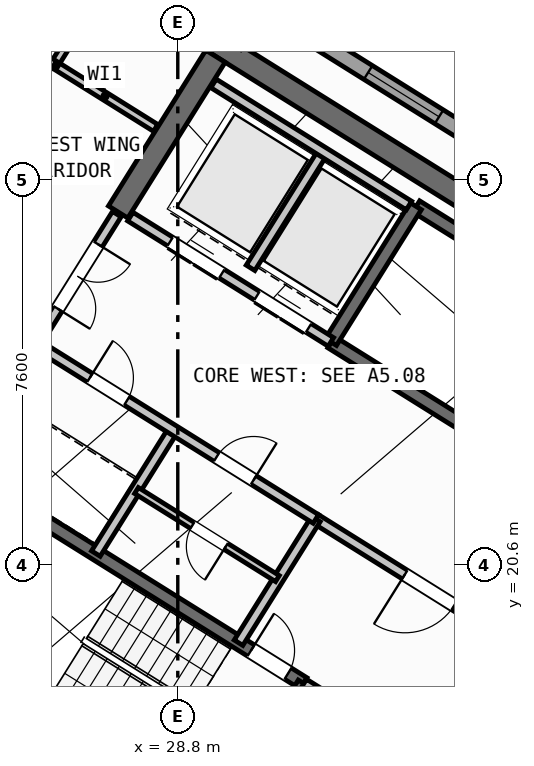
"""IFC4 building model, lengths in metres.
Left out: names, types, materials, properties, quantities, classifications, styles, units other than length and angle.
Written with IfcOpenShell. Run it as: python <this file> out.ifc"""

import sys

from ifc_helpers import new_model, si_unit, direction, frame, frame_2d, origin, place, context, subcontext, project, spatial, rectangle, extrude, source, transform, mapped, element, fill, save


model = new_model("IFC4")
c1 = context("Model", 3, precision=1e-05, world=origin(), true_north=direction((0.0, 1.0)))
c2 = subcontext(c1, "Body", "Model", "MODEL_VIEW")
j1 = project(units=[si_unit("LENGTHUNIT", "METRE"), si_unit("PLANEANGLEUNIT", "RADIAN")], contexts=[c1])
p1 = place(None, origin())
s1 = spatial("IfcSite", under=j1, at=p1, CompositionType="ELEMENT")
p2 = place(p1, origin())
s2 = spatial("IfcBuilding", under=s1, at=p2, CompositionType="ELEMENT")
p3 = place(p2, frame((0.0, 0.0, 262.8)))
s3 = spatial("IfcBuildingStorey", under=s2, at=p3, CompositionType="ELEMENT", Elevation=262.8)
p4 = place(p3, frame((40.531, 24.036, 0.0), z_axis=(0.0, 0.0, 1.0), x_axis=(-0.848048787466, 0.529918157905, 0.0)))
e1 = element("IfcWall", 1, at=p4, inside=s3, PredefinedType="SHEAR", context=c2, shape_type="SweptSolid", body=[
    extrude(rectangle(XDim=13.04, YDim=0.45, at=frame_2d((6.52, 0.0))), origin(), (0.0, 0.0, 1.0), 3.35),
])
p5 = place(p3, frame((33.324, 12.503, 0.0), z_axis=(0.0, 0.0, 1.0), x_axis=(-0.848043529849, 0.529926571782, 0.0)))
e2 = element("IfcWall", 2, at=p5, inside=s3, PredefinedType="SHEAR", context=c2, shape_type="SweptSolid", body=[
    extrude(rectangle(XDim=13.04, YDim=0.45, at=frame_2d((6.52, 0.0))), origin(), (0.0, 0.0, 1.0), 3.35),
])
p6 = place(p3, frame((36.683, 18.304, 0.0), z_axis=(0.0, 0.0, 1.0), x_axis=(-0.529904039071, -0.848057609704, 0.0)))
e3 = element("IfcWall", 3, at=p6, inside=s3, PredefinedType="SHEAR", context=c2, shape_type="SweptSolid", body=[
    extrude(rectangle(XDim=6.475, YDim=0.45, at=frame_2d((3.238, 0.0))), origin(), (0.0, 0.0, 1.0), 3.35),
])
p7 = place(p3, frame((29.544, 30.636, 0.0), z_axis=(0.0, 0.0, 1.0), x_axis=(-0.529902075036, -0.848058836916, 0.0)))
e4 = element("IfcWall", 4, at=p7, inside=s3, PredefinedType="SHEAR", context=c2, shape_type="SweptSolid", body=[
    extrude(rectangle(XDim=3.625, YDim=0.45, at=frame_2d((1.812, 0.0))), origin(), (0.0, 0.0, 1.0), 3.35),
])
p8 = place(p3, frame((29.268, 6.429, 0.0), z_axis=(0.0, 0.0, 1.0), x_axis=(-0.848049971435, 0.529916263149, 0.0)))
e5 = element("IfcWall", 5, at=p8, inside=s3, PredefinedType="STANDARD", context=c2, shape_type="SweptSolid", body=[
    extrude(rectangle(XDim=31.588, YDim=0.32, at=frame_2d((15.794, 0.0))), origin(), (0.0, 0.0, 1.0), 3.35),
])
p9 = place(p8, frame((16.362, 0.0, 0.0)))
e6 = element("IfcOpeningElement", 6, at=p9, cuts=e5, PredefinedType="OPENING", context=c2, shape_type="SweptSolid", body=[
    extrude(rectangle(XDim=1.2, YDim=2.15, at=frame_2d((0.6, 1.075))), frame((0.0, 0.17, 0.0), z_axis=(0.0, -1.0, 0.0), x_axis=(1.0, 0.0, 0.0)), (0.0, 0.0, 1.0), 0.34),
])
p10 = place(p8, frame((3.859, 0.0, 0.9)))
e7 = element("IfcOpeningElement", 7, at=p10, cuts=e5, PredefinedType="OPENING", context=c2, shape_type="SweptSolid", body=[
    extrude(rectangle(XDim=1.65, YDim=1.45, at=frame_2d((0.825, 0.725))), frame((0.0, 0.17, 0.0), z_axis=(0.0, -1.0, 0.0), x_axis=(1.0, 0.0, 0.0)), (0.0, 0.0, 1.0), 0.34),
])
p11 = place(p8, frame((10.519, 0.0, 0.9)))
e8 = element("IfcOpeningElement", 8, at=p11, cuts=e5, PredefinedType="OPENING", context=c2, shape_type="SweptSolid", body=[
    extrude(rectangle(XDim=1.65, YDim=1.45, at=frame_2d((0.825, 0.725))), frame((0.0, 0.17, 0.0), z_axis=(0.0, -1.0, 0.0), x_axis=(1.0, 0.0, 0.0)), (0.0, 0.0, 1.0), 0.34),
])
p12 = place(p8, frame((20.015, 0.0, 0.95)))
e9 = element("IfcOpeningElement", 9, at=p12, cuts=e5, PredefinedType="OPENING", context=c2, shape_type="SweptSolid", body=[
    extrude(rectangle(XDim=1.95, YDim=1.35, at=frame_2d((0.975, 0.675))), frame((0.0, 0.17, 0.0), z_axis=(0.0, -1.0, 0.0), x_axis=(1.0, 0.0, 0.0)), (0.0, 0.0, 1.0), 0.34),
])
p13 = place(p8, frame((23.715, 0.0, 1.0)))
e10 = element("IfcOpeningElement", 10, at=p13, cuts=e5, PredefinedType="OPENING", context=c2, shape_type="SweptSolid", body=[
    extrude(rectangle(XDim=0.9, YDim=1.25, at=frame_2d((0.45, 0.625))), frame((0.0, 0.17, 0.0), z_axis=(0.0, -1.0, 0.0), x_axis=(1.0, 0.0, 0.0)), (0.0, 0.0, 1.0), 0.34),
])
p14 = place(p8, frame((26.391, 0.0, 0.9)))
e11 = element("IfcOpeningElement", 11, at=p14, cuts=e5, PredefinedType="OPENING", context=c2, shape_type="SweptSolid", body=[
    extrude(rectangle(XDim=1.65, YDim=1.45, at=frame_2d((0.825, 0.725))), frame((0.0, 0.17, 0.0), z_axis=(0.0, -1.0, 0.0), x_axis=(1.0, 0.0, 0.0)), (0.0, 0.0, 1.0), 0.34),
])
p15 = place(p8, frame((29.878, 0.0, 1.0)))
e12 = element("IfcOpeningElement", 12, at=p15, cuts=e5, PredefinedType="OPENING", context=c2, shape_type="SweptSolid", body=[
    extrude(rectangle(XDim=0.9, YDim=1.25, at=frame_2d((0.45, 0.625))), frame((0.0, 0.17, 0.0), z_axis=(0.0, -1.0, 0.0), x_axis=(1.0, 0.0, 0.0)), (0.0, 0.0, 1.0), 0.34),
])
p16 = place(p3, frame((14.138, 41.825, 0.0), z_axis=(0.0, 0.0, 1.0), x_axis=(0.848046498049, -0.529921821731, 0.0)))
e13 = element("IfcWall", 13, at=p16, inside=s3, PredefinedType="STANDARD", context=c2, shape_type="SweptSolid", body=[
    extrude(rectangle(XDim=31.588, YDim=0.32, at=frame_2d((15.794, 0.0))), origin(), (0.0, 0.0, 1.0), 3.35),
])
p17 = place(p16, frame((3.568, 0.0, 0.0)))
e14 = element("IfcOpeningElement", 14, at=p17, cuts=e13, PredefinedType="OPENING", context=c2, shape_type="SweptSolid", body=[
    extrude(rectangle(XDim=1.05, YDim=2.15, at=frame_2d((0.525, 1.075))), frame((0.0, 0.17, 0.0), z_axis=(0.0, -1.0, 0.0), x_axis=(1.0, 0.0, 0.0)), (0.0, 0.0, 1.0), 0.34),
])
p18 = place(p16, frame((1.046, 0.0, 0.9)))
e15 = element("IfcOpeningElement", 15, at=p18, cuts=e13, PredefinedType="OPENING", context=c2, shape_type="SweptSolid", body=[
    extrude(rectangle(XDim=1.65, YDim=1.45, at=frame_2d((0.825, 0.725))), frame((0.0, 0.17, 0.0), z_axis=(0.0, -1.0, 0.0), x_axis=(1.0, 0.0, 0.0)), (0.0, 0.0, 1.0), 0.34),
])
p19 = place(p16, frame((8.61, 0.0, 0.9)))
e16 = element("IfcOpeningElement", 16, at=p19, cuts=e13, PredefinedType="OPENING", context=c2, shape_type="SweptSolid", body=[
    extrude(rectangle(XDim=1.35, YDim=1.45, at=frame_2d((0.675, 0.725))), frame((0.0, 0.17, 0.0), z_axis=(0.0, -1.0, 0.0), x_axis=(1.0, 0.0, 0.0)), (0.0, 0.0, 1.0), 0.34),
])
p20 = place(p16, frame((13.599, 0.0, 0.95)))
e17 = element("IfcOpeningElement", 17, at=p20, cuts=e13, PredefinedType="OPENING", context=c2, shape_type="SweptSolid", body=[
    extrude(rectangle(XDim=1.95, YDim=1.35, at=frame_2d((0.975, 0.675))), frame((0.0, 0.17, 0.0), z_axis=(0.0, -1.0, 0.0), x_axis=(1.0, 0.0, 0.0)), (0.0, 0.0, 1.0), 0.34),
])
p21 = place(p16, frame((17.154, 0.0, 1.0)))
e18 = element("IfcOpeningElement", 18, at=p21, cuts=e13, PredefinedType="OPENING", context=c2, shape_type="SweptSolid", body=[
    extrude(rectangle(XDim=0.9, YDim=1.25, at=frame_2d((0.45, 0.625))), frame((0.0, 0.17, 0.0), z_axis=(0.0, -1.0, 0.0), x_axis=(1.0, 0.0, 0.0)), (0.0, 0.0, 1.0), 0.34),
])
p22 = place(p16, frame((21.719, 0.0, 0.9)))
e19 = element("IfcOpeningElement", 19, at=p22, cuts=e13, PredefinedType="OPENING", context=c2, shape_type="SweptSolid", body=[
    extrude(rectangle(XDim=1.65, YDim=1.45, at=frame_2d((0.825, 0.725))), frame((0.0, 0.17, 0.0), z_axis=(0.0, -1.0, 0.0), x_axis=(1.0, 0.0, 0.0)), (0.0, 0.0, 1.0), 0.34),
])
p23 = place(p16, frame((27.419, 0.0, 0.9)))
e20 = element("IfcOpeningElement", 20, at=p23, cuts=e13, PredefinedType="OPENING", context=c2, shape_type="SweptSolid", body=[
    extrude(rectangle(XDim=1.65, YDim=1.45, at=frame_2d((0.825, 0.725))), frame((0.0, 0.17, 0.0), z_axis=(0.0, -1.0, 0.0), x_axis=(1.0, 0.0, 0.0)), (0.0, 0.0, 1.0), 0.34),
])
p24 = place(p3, frame((29.605, 15.581, 0.0), z_axis=(0.0, 0.0, 1.0), x_axis=(-0.848036911448, 0.529937163087, 0.0)))
e21 = element("IfcWall", 21, at=p24, inside=s3, PredefinedType="SHEAR", context=c2, shape_type="SweptSolid", body=[
    extrude(rectangle(XDim=7.46, YDim=0.26, at=frame_2d((3.73, 0.0))), origin(), (0.0, 0.0, 1.0), 3.35),
])
p25 = place(p3, frame((31.28, 18.261, 0.0), z_axis=(0.0, 0.0, 1.0), x_axis=(-0.848051618787, 0.529913626805, 0.0)))
e22 = element("IfcWall", 22, at=p25, inside=s3, PredefinedType="SHEAR", context=c2, shape_type="SweptSolid", body=[
    extrude(rectangle(XDim=7.46, YDim=0.26, at=frame_2d((3.73, 0.0))), origin(), (0.0, 0.0, 1.0), 3.35),
])
p26 = place(p25, frame((0.36, 0.0, 0.0)))
e23 = element("IfcOpeningElement", 23, at=p26, cuts=e22, PredefinedType="OPENING", context=c2, shape_type="SweptSolid", body=[
    extrude(rectangle(XDim=0.86, YDim=2.05, at=frame_2d((0.43, 1.025))), frame((0.0, 0.14, 0.0), z_axis=(0.0, -1.0, 0.0), x_axis=(1.0, 0.0, 0.0)), (0.0, 0.0, 1.0), 0.28),
])
p27 = place(p3, frame((31.288, 18.256, 0.0), z_axis=(0.0, 0.0, 1.0), x_axis=(-0.529943379326, -0.848033026897, 0.0)))
e24 = element("IfcWall", 24, at=p27, inside=s3, PredefinedType="SHEAR", context=c2, shape_type="SweptSolid", body=[
    extrude(rectangle(XDim=3.16, YDim=0.26, at=frame_2d((1.58, 0.0))), origin(), (0.0, 0.0, 1.0), 3.35),
])
p28 = place(p3, frame((39.721, 23.788, 0.0), z_axis=(0.0, 0.0, 1.0), x_axis=(-0.848054434086, 0.529909121291, 0.0)))
e25 = element("IfcWall", 25, at=p28, inside=s3, PredefinedType="SHEAR", context=c2, shape_type="SweptSolid", body=[
    extrude(rectangle(XDim=7.33, YDim=0.26, at=frame_2d((3.665, 0.0))), origin(), (0.0, 0.0, 1.0), 3.35),
])
p29 = place(p3, frame((38.046, 21.108, 0.0), z_axis=(0.0, 0.0, 1.0), x_axis=(-0.848054434086, 0.529909121291, 0.0)))
e26 = element("IfcWall", 26, at=p29, inside=s3, PredefinedType="SHEAR", context=c2, shape_type="SweptSolid", body=[
    extrude(rectangle(XDim=7.33, YDim=0.26, at=frame_2d((3.665, 0.0))), origin(), (0.0, 0.0, 1.0), 3.35),
])
p30 = place(p29, frame((0.22, 0.0, 0.0)))
e27 = element("IfcOpeningElement", 27, at=p30, cuts=e26, PredefinedType="OPENING", context=c2, shape_type="SweptSolid", body=[
    extrude(rectangle(XDim=1.1, YDim=2.1, at=frame_2d((0.55, 1.05))), frame((0.0, 0.14, 0.0), z_axis=(0.0, -1.0, 0.0), x_axis=(1.0, 0.0, 0.0)), (0.0, 0.0, 1.0), 0.28),
])
p31 = place(p3, frame((33.496, 27.677, 0.0), z_axis=(0.0, 0.0, 1.0), x_axis=(-0.529908658664, -0.84805472316, 0.0)))
e28 = element("IfcWall", 28, at=p31, inside=s3, PredefinedType="SHEAR", context=c2, shape_type="SweptSolid", body=[
    extrude(rectangle(XDim=3.16, YDim=0.26, at=frame_2d((1.58, 0.0))), origin(), (0.0, 0.0, 1.0), 3.35),
])
p32 = place(p3, frame((34.933, 15.978, 0.0), z_axis=(0.0, 0.0, 1.0), x_axis=(-0.848055739377, 0.529907032327, 0.0)))
e29 = element("IfcWall", 29, at=p32, inside=s3, PredefinedType="STANDARD", context=c2, shape_type="SweptSolid", body=[
    extrude(rectangle(XDim=4.298, YDim=0.2, at=frame_2d((2.149, 0.0))), origin(), (0.0, 0.0, 1.0), 3.34),
])
p33 = place(p32, frame((0.448, 0.0, 0.0)))
e30 = element("IfcOpeningElement", 30, at=p33, cuts=e29, PredefinedType="OPENING", context=c2, shape_type="SweptSolid", body=[
    extrude(rectangle(XDim=1.3, YDim=2.2, at=frame_2d((0.65, 1.1))), frame((0.0, 0.11, 0.0), z_axis=(0.0, -1.0, 0.0), x_axis=(1.0, 0.0, 0.0)), (0.0, 0.0, 1.0), 0.22),
])
p34 = place(p32, frame((2.523, 0.0, 0.0)))
e31 = element("IfcOpeningElement", 31, at=p34, cuts=e29, PredefinedType="OPENING", context=c2, shape_type="SweptSolid", body=[
    extrude(rectangle(XDim=1.45, YDim=2.25, at=frame_2d((0.725, 1.125))), frame((0.0, 0.11, 0.0), z_axis=(0.0, -1.0, 0.0), x_axis=(1.0, 0.0, 0.0)), (0.0, 0.0, 1.0), 0.22),
])
p35 = place(p3, frame((36.459, 18.421, 0.0), z_axis=(0.0, 0.0, 1.0), x_axis=(-0.848059591691, 0.529900867089, 0.0)))
e32 = element("IfcWall", 32, at=p35, inside=s3, PredefinedType="STANDARD", context=c2, shape_type="SweptSolid", body=[
    extrude(rectangle(XDim=5.818, YDim=0.2, at=frame_2d((2.909, 0.0))), origin(), (0.0, 0.0, 1.0), 3.34),
])
p36 = place(p35, frame((2.598, 0.0, 0.0)))
e33 = element("IfcOpeningElement", 33, at=p36, cuts=e32, PredefinedType="OPENING", context=c2, shape_type="SweptSolid", body=[
    extrude(rectangle(XDim=1.15, YDim=2.1, at=frame_2d((0.575, 1.05))), frame((0.0, 0.11, 0.0), z_axis=(0.0, -1.0, 0.0), x_axis=(1.0, 0.0, 0.0)), (0.0, 0.0, 1.0), 0.22),
])
p37 = place(p3, frame((31.822, 24.998, 0.0), z_axis=(0.0, 0.0, 1.0), x_axis=(-0.848054125777, 0.529909614701, 0.0)))
e34 = element("IfcWall", 34, at=p37, inside=s3, PredefinedType="STANDARD", context=c2, shape_type="SweptSolid", body=[
    extrude(rectangle(XDim=4.668, YDim=0.2, at=frame_2d((2.334, 0.0))), origin(), (0.0, 0.0, 1.0), 3.34),
])
p38 = place(p37, frame((0.52, 0.0, 0.0)))
e35 = element("IfcOpeningElement", 35, at=p38, cuts=e34, PredefinedType="OPENING", context=c2, shape_type="SweptSolid", body=[
    extrude(rectangle(XDim=1.2, YDim=2.15, at=frame_2d((0.6, 1.075))), frame((0.0, 0.11, 0.0), z_axis=(0.0, -1.0, 0.0), x_axis=(1.0, 0.0, 0.0)), (0.0, 0.0, 1.0), 0.22),
])
p39 = place(p37, frame((2.54, 0.0, 0.0)))
e36 = element("IfcOpeningElement", 36, at=p39, cuts=e34, PredefinedType="OPENING", context=c2, shape_type="SweptSolid", body=[
    extrude(rectangle(XDim=1.2, YDim=2.15, at=frame_2d((0.6, 1.075))), frame((0.0, 0.11, 0.0), z_axis=(0.0, -1.0, 0.0), x_axis=(1.0, 0.0, 0.0)), (0.0, 0.0, 1.0), 0.22),
])
p40 = place(p3, frame((31.645, 28.716, 0.0), z_axis=(0.0, 0.0, 1.0), x_axis=(-0.52986693015, -0.848080795876, 0.0)))
e37 = element("IfcWall", 37, at=p40, inside=s3, PredefinedType="STANDARD", context=c2, shape_type="SweptSolid", body=[
    extrude(rectangle(XDim=2.66, YDim=0.2, at=frame_2d((1.33, 0.0))), origin(), (0.0, 0.0, 1.0), 3.34),
])
p41 = place(p3, frame((33.363, 27.69, 0.0), z_axis=(0.0, 0.0, 1.0), x_axis=(-0.84804957148, 0.529916903215, 0.0)))
e38 = element("IfcWall", 38, at=p41, inside=s3, PredefinedType="STANDARD", context=c2, shape_type="SweptSolid", body=[
    extrude(rectangle(XDim=4.548, YDim=0.2, at=frame_2d((2.274, 0.0))), origin(), (0.0, 0.0, 1.0), 3.34),
])
for number, where, z_axis, x_axis in (
    (39, (31.525, 21.504, 0.0), (0.0, 0.0, 1.0), (-0.53, -0.848, 0.0)),
    (40, (28.71, 23.263, 0.0), (0.0, 0.0, 1.0), (-0.53, -0.848, 0.0)),
):
    element("IfcWall", number, at=place(p3, frame(where, z_axis=z_axis, x_axis=x_axis)), inside=s3, PredefinedType="STANDARD", context=c2, shape_type="SweptSolid", body=[
        extrude(rectangle(XDim=2.88, YDim=0.2, at=frame_2d((1.44, 0.0))), origin(), (0.0, 0.0, 1.0), 3.34),
    ])
p42 = place(p3, frame((31.525, 21.504, 0.0), z_axis=(0.0, 0.0, 1.0), x_axis=(-0.848042066329, 0.529928913853, 0.0)))
e41 = element("IfcWall", 41, at=p42, inside=s3, PredefinedType="STANDARD", context=c2, shape_type="SweptSolid", body=[
    extrude(rectangle(XDim=6.268, YDim=0.2, at=frame_2d((3.134, 0.0))), origin(), (0.0, 0.0, 1.0), 3.34),
])
p43 = place(p42, frame((4.4, 0.0, 0.0)))
e42 = element("IfcOpeningElement", 42, at=p43, cuts=e41, PredefinedType="OPENING", context=c2, shape_type="SweptSolid", body=[
    extrude(rectangle(XDim=0.86, YDim=2.05, at=frame_2d((0.43, 1.025))), frame((0.0, 0.11, 0.0), z_axis=(0.0, -1.0, 0.0), x_axis=(1.0, 0.0, 0.0)), (0.0, 0.0, 1.0), 0.22),
])
p44 = place(p42, frame((1.45, 0.0, 0.0)))
e43 = element("IfcOpeningElement", 43, at=p44, cuts=e41, PredefinedType="OPENING", context=c2, shape_type="SweptSolid", body=[
    extrude(rectangle(XDim=0.86, YDim=2.05, at=frame_2d((0.43, 1.025))), frame((0.0, 0.11, 0.0), z_axis=(0.0, -1.0, 0.0), x_axis=(1.0, 0.0, 0.0)), (0.0, 0.0, 1.0), 0.22),
])
p45 = place(p3, frame((30.766, 20.327, 0.0), z_axis=(0.0, 0.0, 1.0), x_axis=(-0.848052663127, 0.529911955482, 0.0)))
e44 = element("IfcWall", 44, at=p45, inside=s3, PredefinedType="PLUMBINGWALL", context=c2, shape_type="SweptSolid", body=[
    extrude(rectangle(XDim=3.28, YDim=0.14, at=frame_2d((1.64, 0.0))), origin(), (0.0, 0.0, 1.0), 3.34),
])
p46 = place(p45, frame((1.2, 0.0, 0.0)))
e45 = element("IfcOpeningElement", 45, at=p46, cuts=e44, PredefinedType="OPENING", context=c2, shape_type="SweptSolid", body=[
    extrude(rectangle(XDim=0.78, YDim=2.05, at=frame_2d((0.39, 1.025))), frame((0.0, 0.08, 0.0), z_axis=(0.0, -1.0, 0.0), x_axis=(1.0, 0.0, 0.0)), (0.0, 0.0, 1.0), 0.16),
])
p47 = place(p3, frame((27.596, 27.52, 0.0), z_axis=(0.0, 0.0, 1.0), x_axis=(-0.529865479138, -0.848081702443, 0.0)))
e46 = element("IfcWall", 46, at=p47, inside=s3, PredefinedType="STANDARD", context=c2, shape_type="SweptSolid", body=[
    extrude(rectangle(XDim=2.96, YDim=0.2, at=frame_2d((1.48, 0.0))), origin(), (0.0, 0.0, 1.0), 3.34),
])
p48 = place(p47, frame((0.7, 0.0, 0.0)))
e47 = element("IfcOpeningElement", 47, at=p48, cuts=e46, PredefinedType="OPENING", context=c2, shape_type="SweptSolid", body=[
    extrude(rectangle(XDim=1.5, YDim=2.15, at=frame_2d((0.75, 1.075))), frame((0.0, 0.11, 0.0), z_axis=(0.0, -1.0, 0.0), x_axis=(1.0, 0.0, 0.0)), (0.0, 0.0, 1.0), 0.22),
])
p49 = place(p3, frame((28.363, 29.222, 0.0), z_axis=(0.0, 0.0, 1.0), x_axis=(-0.848062280664, 0.529896563599, 0.0)))
e48 = element("IfcWall", 48, at=p49, inside=s3, PredefinedType="PARTITIONING", context=c2, shape_type="SweptSolid", body=[
    extrude(rectangle(XDim=2.358, YDim=0.16, at=frame_2d((1.179, 0.0))), origin(), (0.0, 0.0, 1.0), 3.34),
])
p50 = place(p3, frame((27.953, 33.016, 0.0), z_axis=(0.0, 0.0, 1.0), x_axis=(-0.529874576144, -0.848076018737, 0.0)))
e49 = element("IfcWall", 49, at=p50, inside=s3, PredefinedType="PARTITIONING", context=c2, shape_type="SweptSolid", body=[
    extrude(rectangle(XDim=3.0, YDim=0.16, at=frame_2d((1.5, 0.0))), origin(), (0.0, 0.0, 1.0), 3.34),
])
p51 = place(p3, frame((26.363, 30.472, 0.0), z_axis=(0.0, 0.0, 1.0), x_axis=(-0.848052408131, 0.529912363569, 0.0)))
e50 = element("IfcWall", 50, at=p51, inside=s3, PredefinedType="PARTITIONING", context=c2, shape_type="SweptSolid", body=[
    extrude(rectangle(XDim=16.73, YDim=0.16, at=frame_2d((8.365, 0.0))), origin(), (0.0, 0.0, 1.0), 3.34),
])
p52 = place(p51, frame((1.588, 0.0, 0.0)))
e51 = element("IfcOpeningElement", 51, at=p52, cuts=e50, PredefinedType="OPENING", context=c2, shape_type="SweptSolid", body=[
    extrude(rectangle(XDim=1.0, YDim=2.1, at=frame_2d((0.5, 1.05))), frame((0.0, 0.09, 0.0), z_axis=(0.0, -1.0, 0.0), x_axis=(1.0, 0.0, 0.0)), (0.0, 0.0, 1.0), 0.18),
])
p53 = place(p51, frame((6.685, 0.0, 0.0)))
e52 = element("IfcOpeningElement", 52, at=p53, cuts=e50, PredefinedType="OPENING", context=c2, shape_type="SweptSolid", body=[
    extrude(rectangle(XDim=1.0, YDim=2.1, at=frame_2d((0.5, 1.05))), frame((0.0, 0.09, 0.0), z_axis=(0.0, -1.0, 0.0), x_axis=(1.0, 0.0, 0.0)), (0.0, 0.0, 1.0), 0.18),
])
p54 = place(p51, frame((12.951, 0.0, 0.0)))
e53 = element("IfcOpeningElement", 53, at=p54, cuts=e50, PredefinedType="OPENING", context=c2, shape_type="SweptSolid", body=[
    extrude(rectangle(XDim=1.0, YDim=2.1, at=frame_2d((0.5, 1.05))), frame((0.0, 0.09, 0.0), z_axis=(0.0, -1.0, 0.0), x_axis=(1.0, 0.0, 0.0)), (0.0, 0.0, 1.0), 0.18),
])
p55 = place(p3, frame((32.164, 10.374, 0.0), z_axis=(0.0, 0.0, 1.0), x_axis=(-0.848044107957, 0.529925646633, 0.0)))
e54 = element("IfcWall", 54, at=p55, inside=s3, PredefinedType="PARTITIONING", context=c2, shape_type="SweptSolid", body=[
    extrude(rectangle(XDim=15.57, YDim=0.16, at=frame_2d((7.785, 0.0))), origin(), (0.0, 0.0, 1.0), 3.34),
])
p56 = place(p55, frame((10.83, 0.0, 0.0)))
e55 = element("IfcOpeningElement", 55, at=p56, cuts=e54, PredefinedType="OPENING", context=c2, shape_type="SweptSolid", body=[
    extrude(rectangle(XDim=1.0, YDim=2.1, at=frame_2d((0.5, 1.05))), frame((0.0, 0.09, 0.0), z_axis=(0.0, -1.0, 0.0), x_axis=(1.0, 0.0, 0.0)), (0.0, 0.0, 1.0), 0.18),
])
m1 = source(origin(), c2, "Body", "SweptSolid", [
    extrude(rectangle(XDim=1.65, YDim=1.45, at=frame_2d((0.825, 0.725))), frame((0.0, 0.03, 0.0), z_axis=(0.0, -1.0, 0.0), x_axis=(1.0, 0.0, 0.0)), (0.0, 0.0, 1.0), 0.06),
])
p57 = place(p22, origin())
e56 = element("IfcWindow", 56, at=p57, inside=s3, PartitioningType="SINGLE_PANEL", PredefinedType="WINDOW", context=c2, shape_type="MappedRepresentation", body=[
    mapped(m1, transform((0.0, 0.0, 0.0), scale=1.0)),
])
fill(e19, e56)
m2 = source(origin(), c2, "Body", "SweptSolid", [
    extrude(rectangle(XDim=0.86, YDim=2.05, at=frame_2d((0.43, 1.025))), frame((0.0, 0.025, 0.0), z_axis=(0.0, -1.0, 0.0), x_axis=(1.0, 0.0, 0.0)), (0.0, 0.0, 1.0), 0.05),
])
p58 = place(p26, frame((0.86, 0.0, 0.0), z_axis=(0.0, 0.0, 1.0), x_axis=(-1.0, 0.0, 0.0)))
e57 = element("IfcDoor", 57, at=p58, inside=s3, OperationType="SINGLE_SWING_LEFT", PredefinedType="DOOR", context=c2, shape_type="MappedRepresentation", body=[
    mapped(m2, transform((0.0, 0.0, 0.0), scale=1.0)),
])
fill(e23, e57)
m3 = source(origin(), c2, "Body", "SweptSolid", [
    extrude(rectangle(XDim=1.15, YDim=2.1, at=frame_2d((0.575, 1.05))), frame((0.0, 0.025, 0.0), z_axis=(0.0, -1.0, 0.0), x_axis=(1.0, 0.0, 0.0)), (0.0, 0.0, 1.0), 0.05),
])
p59 = place(p36, origin())
e58 = element("IfcDoor", 58, at=p59, inside=s3, OperationType="SINGLE_SWING_RIGHT", PredefinedType="DOOR", context=c2, shape_type="MappedRepresentation", body=[
    mapped(m3, transform((0.0, 0.0, 0.0), scale=1.0)),
])
fill(e33, e58)
m4 = source(origin(), c2, "Body", "SweptSolid", [
    extrude(rectangle(XDim=1.2, YDim=2.15, at=frame_2d((0.6, 1.075))), frame((0.0, 0.025, 0.0), z_axis=(0.0, -1.0, 0.0), x_axis=(1.0, 0.0, 0.0)), (0.0, 0.0, 1.0), 0.05),
])
p60 = place(p38, origin())
e59 = element("IfcDoor", 59, at=p60, inside=s3, OperationType="DOUBLE_DOOR_SLIDING", PredefinedType="DOOR", context=c2, shape_type="MappedRepresentation", body=[
    mapped(m4, transform((0.0, 0.0, 0.0), scale=1.0)),
])
fill(e35, e59)
p61 = place(p39, origin())
e60 = element("IfcDoor", 60, at=p61, inside=s3, OperationType="DOUBLE_DOOR_SLIDING", PredefinedType="DOOR", context=c2, shape_type="MappedRepresentation", body=[
    mapped(m4, transform((0.0, 0.0, 0.0), scale=1.0)),
])
fill(e36, e60)
p62 = place(p43, frame((0.86, 0.0, 0.0), z_axis=(0.0, 0.0, 1.0), x_axis=(-1.0, 0.0, 0.0)))
e61 = element("IfcDoor", 61, at=p62, inside=s3, OperationType="SINGLE_SWING_LEFT", PredefinedType="DOOR", context=c2, shape_type="MappedRepresentation", body=[
    mapped(m2, transform((0.0, 0.0, 0.0), scale=1.0)),
])
fill(e42, e61)
p63 = place(p44, frame((0.86, 0.0, 0.0), z_axis=(0.0, 0.0, 1.0), x_axis=(-1.0, 0.0, 0.0)))
e62 = element("IfcDoor", 62, at=p63, inside=s3, OperationType="SINGLE_SWING_RIGHT", PredefinedType="DOOR", context=c2, shape_type="MappedRepresentation", body=[
    mapped(m2, transform((0.0, 0.0, 0.0), scale=1.0)),
])
fill(e43, e62)
m5 = source(origin(), c2, "Body", "SweptSolid", [
    extrude(rectangle(XDim=0.78, YDim=2.05, at=frame_2d((0.39, 1.025))), frame((0.0, 0.025, 0.0), z_axis=(0.0, -1.0, 0.0), x_axis=(1.0, 0.0, 0.0)), (0.0, 0.0, 1.0), 0.05),
])
p64 = place(p46, origin())
e63 = element("IfcDoor", 63, at=p64, inside=s3, OperationType="SINGLE_SWING_LEFT", PredefinedType="DOOR", context=c2, shape_type="MappedRepresentation", body=[
    mapped(m5, transform((0.0, 0.0, 0.0), scale=1.0)),
])
fill(e45, e63)
m6 = source(origin(), c2, "Body", "SweptSolid", [
    extrude(rectangle(XDim=1.5, YDim=2.15, at=frame_2d((0.75, 1.075))), frame((0.0, 0.025, 0.0), z_axis=(0.0, -1.0, 0.0), x_axis=(1.0, 0.0, 0.0)), (0.0, 0.0, 1.0), 0.05),
])
p65 = place(p48, origin())
e64 = element("IfcDoor", 64, at=p65, inside=s3, OperationType="DOUBLE_DOOR_SINGLE_SWING", PredefinedType="DOOR", context=c2, shape_type="MappedRepresentation", body=[
    mapped(m6, transform((0.0, 0.0, 0.0), scale=1.0)),
])
fill(e47, e64)
save(model, sys.argv[1])
